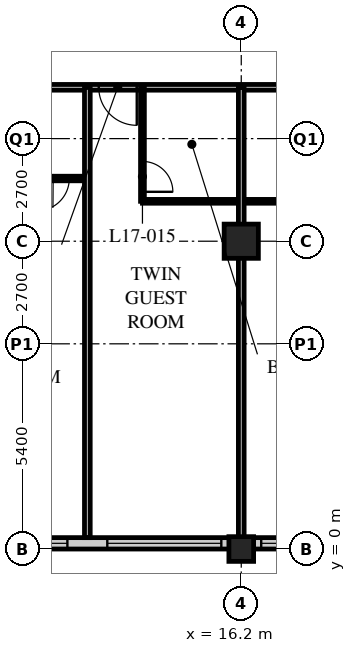
"""IFC4 building model, lengths in metres.
Left out: names, types, materials, properties, quantities, classifications, styles, units other than length and angle.
Written with IfcOpenShell. Run it as: python <this file> out.ifc"""

import sys

from ifc_helpers import new_model, si_unit, direction, frame, frame_2d, origin, origin_2d, place, context, subcontext, project, spatial, rectangle, hollow_rectangle, extrude, element, fill, save


model = new_model("IFC4")
c1 = context("Model", 3, precision=1e-05, world=origin(), true_north=direction((0.0, 1.0)))
c2 = subcontext(c1, "Body", "Model", "MODEL_VIEW")
j1 = project(units=[si_unit("LENGTHUNIT", "METRE"), si_unit("PLANEANGLEUNIT", "RADIAN")], contexts=[c1])
p1 = place(None, origin())
s1 = spatial("IfcSite", under=j1, at=p1, CompositionType="ELEMENT")
p2 = place(p1, origin())
s2 = spatial("IfcBuilding", under=s1, at=p2, CompositionType="ELEMENT")
p3 = place(p2, frame((0.0, 0.0, 70.4)))
s3 = spatial("IfcBuildingStorey", under=s2, at=p3, CompositionType="ELEMENT", Elevation=70.4)
p4 = place(p3, frame((16.2, 0.0, 0.0), z_axis=(0.0, 0.0, 1.0), x_axis=(1.0, 0.0, 0.0)))
e1 = element("IfcColumn", 1, at=p4, inside=s3, PredefinedType="COLUMN", context=c2, shape_type="SweptSolid", body=[
    extrude(hollow_rectangle(XDim=0.65, YDim=0.65, WallThickness=0.05, at=origin_2d()), origin(), (0.0, 0.0, 1.0), 3.4),
])
p5 = place(p3, frame((16.2, 8.1, 0.0), z_axis=(0.0, 0.0, 1.0), x_axis=(1.0, 0.0, 0.0)))
e2 = element("IfcColumn", 2, at=p5, inside=s3, PredefinedType="COLUMN", context=c2, shape_type="SweptSolid", body=[
    extrude(hollow_rectangle(XDim=0.9, YDim=0.9, WallThickness=0.09, at=origin_2d()), origin(), (0.0, 0.0, 1.0), 3.4),
])
p6 = place(p3, frame((8.4, 0.15, 0.0), z_axis=(0.0, 0.0, 1.0), x_axis=(1.0, 0.0, 0.0)))
e3 = element("IfcWall", 3, at=p6, inside=s3, PredefinedType="SOLIDWALL", context=c2, shape_type="SweptSolid", body=[
    extrude(rectangle(XDim=40.2, YDim=0.3, at=frame_2d((20.1, 0.0))), origin(), (0.0, 0.0, 1.0), 3.19),
])
p7 = place(p6, frame((0.225, 0.0, 0.9)))
e4 = element("IfcOpeningElement", 4, at=p7, cuts=e3, PredefinedType="OPENING", context=c2, shape_type="SweptSolid", body=[
    extrude(rectangle(XDim=3.0, YDim=2.0, at=frame_2d((1.5, 1.0))), frame((0.0, 0.16, 0.0), z_axis=(0.0, -1.0, 0.0), x_axis=(1.0, 0.0, 0.0)), (0.0, 0.0, 1.0), 0.32),
])
p8 = place(p6, frame((4.275, 0.0, 0.9)))
e5 = element("IfcOpeningElement", 5, at=p8, cuts=e3, PredefinedType="OPENING", context=c2, shape_type="SweptSolid", body=[
    extrude(rectangle(XDim=3.0, YDim=2.0, at=frame_2d((1.5, 1.0))), frame((0.0, 0.16, 0.0), z_axis=(0.0, -1.0, 0.0), x_axis=(1.0, 0.0, 0.0)), (0.0, 0.0, 1.0), 0.32),
])
p9 = place(p6, frame((8.325, 0.0, 0.9)))
e6 = element("IfcOpeningElement", 6, at=p9, cuts=e3, PredefinedType="OPENING", context=c2, shape_type="SweptSolid", body=[
    extrude(rectangle(XDim=3.0, YDim=2.0, at=frame_2d((1.5, 1.0))), frame((0.0, 0.16, 0.0), z_axis=(0.0, -1.0, 0.0), x_axis=(1.0, 0.0, 0.0)), (0.0, 0.0, 1.0), 0.32),
])
p10 = place(p6, frame((12.375, 0.0, 0.9)))
e7 = element("IfcOpeningElement", 7, at=p10, cuts=e3, PredefinedType="OPENING", context=c2, shape_type="SweptSolid", body=[
    extrude(rectangle(XDim=3.0, YDim=2.0, at=frame_2d((1.5, 1.0))), frame((0.0, 0.16, 0.0), z_axis=(0.0, -1.0, 0.0), x_axis=(1.0, 0.0, 0.0)), (0.0, 0.0, 1.0), 0.32),
])
p11 = place(p6, frame((16.425, 0.0, 0.9)))
e8 = element("IfcOpeningElement", 8, at=p11, cuts=e3, PredefinedType="OPENING", context=c2, shape_type="SweptSolid", body=[
    extrude(rectangle(XDim=3.0, YDim=2.0, at=frame_2d((1.5, 1.0))), frame((0.0, 0.16, 0.0), z_axis=(0.0, -1.0, 0.0), x_axis=(1.0, 0.0, 0.0)), (0.0, 0.0, 1.0), 0.32),
])
p12 = place(p6, frame((20.475, 0.0, 0.9)))
e9 = element("IfcOpeningElement", 9, at=p12, cuts=e3, PredefinedType="OPENING", context=c2, shape_type="SweptSolid", body=[
    extrude(rectangle(XDim=3.0, YDim=2.0, at=frame_2d((1.5, 1.0))), frame((0.0, 0.16, 0.0), z_axis=(0.0, -1.0, 0.0), x_axis=(1.0, 0.0, 0.0)), (0.0, 0.0, 1.0), 0.32),
])
p13 = place(p6, frame((24.525, 0.0, 0.9)))
e10 = element("IfcOpeningElement", 10, at=p13, cuts=e3, PredefinedType="OPENING", context=c2, shape_type="SweptSolid", body=[
    extrude(rectangle(XDim=3.0, YDim=2.0, at=frame_2d((1.5, 1.0))), frame((0.0, 0.16, 0.0), z_axis=(0.0, -1.0, 0.0), x_axis=(1.0, 0.0, 0.0)), (0.0, 0.0, 1.0), 0.32),
])
p14 = place(p6, frame((28.575, 0.0, 0.9)))
e11 = element("IfcOpeningElement", 11, at=p14, cuts=e3, PredefinedType="OPENING", context=c2, shape_type="SweptSolid", body=[
    extrude(rectangle(XDim=3.0, YDim=2.0, at=frame_2d((1.5, 1.0))), frame((0.0, 0.16, 0.0), z_axis=(0.0, -1.0, 0.0), x_axis=(1.0, 0.0, 0.0)), (0.0, 0.0, 1.0), 0.32),
])
p15 = place(p6, frame((32.625, 0.0, 0.9)))
e12 = element("IfcOpeningElement", 12, at=p15, cuts=e3, PredefinedType="OPENING", context=c2, shape_type="SweptSolid", body=[
    extrude(rectangle(XDim=3.0, YDim=2.0, at=frame_2d((1.5, 1.0))), frame((0.0, 0.16, 0.0), z_axis=(0.0, -1.0, 0.0), x_axis=(1.0, 0.0, 0.0)), (0.0, 0.0, 1.0), 0.32),
])
p16 = place(p6, frame((36.675, 0.0, 0.9)))
e13 = element("IfcOpeningElement", 13, at=p16, cuts=e3, PredefinedType="OPENING", context=c2, shape_type="SweptSolid", body=[
    extrude(rectangle(XDim=3.0, YDim=2.0, at=frame_2d((1.5, 1.0))), frame((0.0, 0.16, 0.0), z_axis=(0.0, -1.0, 0.0), x_axis=(1.0, 0.0, 0.0)), (0.0, 0.0, 1.0), 0.32),
])
p17 = place(p3, frame((8.1, 12.15, 0.0), z_axis=(0.0, 0.0, 1.0), x_axis=(1.0, 0.0, 0.0)))
e14 = element("IfcWall", 14, at=p17, inside=s3, PredefinedType="PARTITIONING", context=c2, shape_type="SweptSolid", body=[
    extrude(rectangle(XDim=36.45, YDim=0.15, at=frame_2d((18.225, 0.0))), origin(), (0.0, 0.0, 1.0), 3.19),
])
p18 = place(p17, frame((4.35, 0.0, 0.0)))
e15 = element("IfcOpeningElement", 15, at=p18, cuts=e14, PredefinedType="OPENING", context=c2, shape_type="SweptSolid", body=[
    extrude(rectangle(XDim=1.0, YDim=2.1, at=frame_2d((0.5, 1.05))), frame((0.0, 0.085, 0.0), z_axis=(0.0, -1.0, 0.0), x_axis=(1.0, 0.0, 0.0)), (0.0, 0.0, 1.0), 0.17),
])
p19 = place(p17, frame((10.55, 0.0, 0.0)))
e16 = element("IfcOpeningElement", 16, at=p19, cuts=e14, PredefinedType="OPENING", context=c2, shape_type="SweptSolid", body=[
    extrude(rectangle(XDim=1.0, YDim=2.1, at=frame_2d((0.5, 1.05))), frame((0.0, 0.085, 0.0), z_axis=(0.0, -1.0, 0.0), x_axis=(1.0, 0.0, 0.0)), (0.0, 0.0, 1.0), 0.17),
])
p20 = place(p17, frame((14.6, 0.0, 0.0)))
e17 = element("IfcOpeningElement", 17, at=p20, cuts=e14, PredefinedType="OPENING", context=c2, shape_type="SweptSolid", body=[
    extrude(rectangle(XDim=1.0, YDim=2.1, at=frame_2d((0.5, 1.05))), frame((0.0, 0.085, 0.0), z_axis=(0.0, -1.0, 0.0), x_axis=(1.0, 0.0, 0.0)), (0.0, 0.0, 1.0), 0.17),
])
p21 = place(p17, frame((18.65, 0.0, 0.0)))
e18 = element("IfcOpeningElement", 18, at=p21, cuts=e14, PredefinedType="OPENING", context=c2, shape_type="SweptSolid", body=[
    extrude(rectangle(XDim=1.0, YDim=2.1, at=frame_2d((0.5, 1.05))), frame((0.0, 0.085, 0.0), z_axis=(0.0, -1.0, 0.0), x_axis=(1.0, 0.0, 0.0)), (0.0, 0.0, 1.0), 0.17),
])
p22 = place(p17, frame((22.7, 0.0, 0.0)))
e19 = element("IfcOpeningElement", 19, at=p22, cuts=e14, PredefinedType="OPENING", context=c2, shape_type="SweptSolid", body=[
    extrude(rectangle(XDim=1.0, YDim=2.1, at=frame_2d((0.5, 1.05))), frame((0.0, 0.085, 0.0), z_axis=(0.0, -1.0, 0.0), x_axis=(1.0, 0.0, 0.0)), (0.0, 0.0, 1.0), 0.17),
])
p23 = place(p17, frame((24.6, 0.0, 0.0)))
e20 = element("IfcOpeningElement", 20, at=p23, cuts=e14, PredefinedType="OPENING", context=c2, shape_type="SweptSolid", body=[
    extrude(rectangle(XDim=1.0, YDim=2.1, at=frame_2d((0.5, 1.05))), frame((0.0, 0.085, 0.0), z_axis=(0.0, -1.0, 0.0), x_axis=(1.0, 0.0, 0.0)), (0.0, 0.0, 1.0), 0.17),
])
p24 = place(p17, frame((30.8, 0.0, 0.0)))
e21 = element("IfcOpeningElement", 21, at=p24, cuts=e14, PredefinedType="OPENING", context=c2, shape_type="SweptSolid", body=[
    extrude(rectangle(XDim=1.0, YDim=2.1, at=frame_2d((0.5, 1.05))), frame((0.0, 0.085, 0.0), z_axis=(0.0, -1.0, 0.0), x_axis=(1.0, 0.0, 0.0)), (0.0, 0.0, 1.0), 0.17),
])
p25 = place(p17, frame((1.525, 0.0, 0.0)))
e22 = element("IfcOpeningElement", 22, at=p25, cuts=e14, PredefinedType="OPENING", context=c2, shape_type="SweptSolid", body=[
    extrude(rectangle(XDim=1.0, YDim=2.1, at=frame_2d((0.5, 1.05))), frame((0.0, 0.085, 0.0), z_axis=(0.0, -1.0, 0.0), x_axis=(1.0, 0.0, 0.0)), (0.0, 0.0, 1.0), 0.17),
])
p26 = place(p17, frame((33.925, 0.0, 0.0)))
e23 = element("IfcOpeningElement", 23, at=p26, cuts=e14, PredefinedType="OPENING", context=c2, shape_type="SweptSolid", body=[
    extrude(rectangle(XDim=1.0, YDim=2.1, at=frame_2d((0.5, 1.05))), frame((0.0, 0.085, 0.0), z_axis=(0.0, -1.0, 0.0), x_axis=(1.0, 0.0, 0.0)), (0.0, 0.0, 1.0), 0.17),
])
p27 = place(p3, frame((13.6, 9.15, 0.0), z_axis=(0.0, 0.0, 1.0), x_axis=(1.0, 0.0, 0.0)))
e24 = element("IfcWall", 24, at=p27, inside=s3, PredefinedType="PARTITIONING", context=c2, shape_type="SweptSolid", body=[
    extrude(rectangle(XDim=4.9, YDim=0.1, at=frame_2d((2.45, 0.0))), origin(), (0.0, 0.0, 1.0), 3.19),
])
p28 = place(p3, frame((13.6, 12.15, 0.0), z_axis=(0.0, 0.0, 1.0), x_axis=(0.0, -1.0, 0.0)))
e25 = element("IfcWall", 25, at=p28, inside=s3, PredefinedType="PARTITIONING", context=c2, shape_type="SweptSolid", body=[
    extrude(rectangle(XDim=3.0, YDim=0.1, at=frame_2d((1.5, 0.0))), origin(), (0.0, 0.0, 1.0), 3.19),
])
p29 = place(p28, frame((1.95, 0.0, 0.0)))
e26 = element("IfcOpeningElement", 26, at=p29, cuts=e25, PredefinedType="OPENING", context=c2, shape_type="SweptSolid", body=[
    extrude(rectangle(XDim=0.8, YDim=2.1, at=frame_2d((0.4, 1.05))), frame((0.0, 0.06, 0.0), z_axis=(0.0, -1.0, 0.0), x_axis=(1.0, 0.0, 0.0)), (0.0, 0.0, 1.0), 0.12),
])
p30 = place(p3, frame((16.2, 12.15, 0.0), z_axis=(0.0, 0.0, 1.0), x_axis=(0.0, -1.0, 0.0)))
e27 = element("IfcWall", 27, at=p30, inside=s3, PredefinedType="PARTITIONING", context=c2, shape_type="SweptSolid", body=[
    extrude(rectangle(XDim=11.85, YDim=0.15, at=frame_2d((5.925, 0.0))), origin(), (0.0, 0.0, 1.0), 2.578),
])
p31 = place(p3, frame((4.1, 9.75, 0.0), z_axis=(0.0, 0.0, 1.0), x_axis=(1.0, 0.0, 0.0)))
e28 = element("IfcWall", 28, at=p31, inside=s3, PredefinedType="PARTITIONING", context=c2, shape_type="SweptSolid", body=[
    extrude(rectangle(XDim=8.05, YDim=0.12, at=frame_2d((4.025, 0.0))), origin(), (0.0, 0.0, 1.0), 3.19),
])
p32 = place(p31, frame((6.725, 0.0, 0.0)))
e29 = element("IfcOpeningElement", 29, at=p32, cuts=e28, PredefinedType="OPENING", context=c2, shape_type="SweptSolid", body=[
    extrude(rectangle(XDim=0.85, YDim=2.1, at=frame_2d((0.425, 1.05))), frame((0.0, 0.07, 0.0), z_axis=(0.0, -1.0, 0.0), x_axis=(1.0, 0.0, 0.0)), (0.0, 0.0, 1.0), 0.14),
])
p33 = place(p31, frame((2.875, 0.0, 0.0)))
e30 = element("IfcOpeningElement", 30, at=p33, cuts=e28, PredefinedType="OPENING", context=c2, shape_type="SweptSolid", body=[
    extrude(rectangle(XDim=0.85, YDim=2.1, at=frame_2d((0.425, 1.05))), frame((0.0, 0.07, 0.0), z_axis=(0.0, -1.0, 0.0), x_axis=(1.0, 0.0, 0.0)), (0.0, 0.0, 1.0), 0.14),
])
p34 = place(p3, frame((12.15, 12.15, 0.0), z_axis=(0.0, 0.0, 1.0), x_axis=(0.0, -1.0, 0.0)))
e31 = element("IfcWall", 31, at=p34, inside=s3, PredefinedType="PARTITIONING", context=c2, shape_type="SweptSolid", body=[
    extrude(rectangle(XDim=11.85, YDim=0.15, at=frame_2d((5.925, 0.0))), origin(), (0.0, 0.0, 1.0), 3.19),
])
p35 = place(p7, origin())
e32 = element("IfcWindow", 32, at=p35, inside=s3, PartitioningType="SINGLE_PANEL", PredefinedType="WINDOW", context=c2, shape_type="SweptSolid", body=[
    extrude(rectangle(XDim=3.0, YDim=2.0, at=frame_2d((1.5, 1.0))), frame((0.0, 0.03, 0.0), z_axis=(0.0, -1.0, 0.0), x_axis=(1.0, 0.0, 0.0)), (0.0, 0.0, 1.0), 0.06),
])
fill(e4, e32)
p36 = place(p8, origin())
e33 = element("IfcWindow", 33, at=p36, inside=s3, PartitioningType="SINGLE_PANEL", PredefinedType="WINDOW", context=c2, shape_type="SweptSolid", body=[
    extrude(rectangle(XDim=3.0, YDim=2.0, at=frame_2d((1.5, 1.0))), frame((0.0, 0.03, 0.0), z_axis=(0.0, -1.0, 0.0), x_axis=(1.0, 0.0, 0.0)), (0.0, 0.0, 1.0), 0.06),
])
fill(e5, e33)
p37 = place(p9, origin())
e34 = element("IfcWindow", 34, at=p37, inside=s3, PartitioningType="SINGLE_PANEL", PredefinedType="WINDOW", context=c2, shape_type="SweptSolid", body=[
    extrude(rectangle(XDim=3.0, YDim=2.0, at=frame_2d((1.5, 1.0))), frame((0.0, 0.03, 0.0), z_axis=(0.0, -1.0, 0.0), x_axis=(1.0, 0.0, 0.0)), (0.0, 0.0, 1.0), 0.06),
])
fill(e6, e34)
p38 = place(p29, origin())
e35 = element("IfcDoor", 35, at=p38, inside=s3, OperationType="SINGLE_SWING_RIGHT", PredefinedType="DOOR", context=c2, shape_type="SweptSolid", body=[
    extrude(rectangle(XDim=0.8, YDim=2.1, at=frame_2d((0.4, 1.05))), frame((0.0, 0.025, 0.0), z_axis=(0.0, -1.0, 0.0), x_axis=(1.0, 0.0, 0.0)), (0.0, 0.0, 1.0), 0.05),
])
fill(e26, e35)
p39 = place(p18, origin())
e36 = element("IfcDoor", 36, at=p39, inside=s3, OperationType="SINGLE_SWING_LEFT", PredefinedType="DOOR", context=c2, shape_type="SweptSolid", body=[
    extrude(rectangle(XDim=1.0, YDim=2.1, at=frame_2d((0.5, 1.05))), frame((0.0, 0.025, 0.0), z_axis=(0.0, -1.0, 0.0), x_axis=(1.0, 0.0, 0.0)), (0.0, 0.0, 1.0), 0.05),
])
fill(e15, e36)
p40 = place(p32, origin())
e37 = element("IfcDoor", 37, at=p40, inside=s3, OperationType="SINGLE_SWING_RIGHT", PredefinedType="DOOR", context=c2, shape_type="SweptSolid", body=[
    extrude(rectangle(XDim=0.85, YDim=2.1, at=frame_2d((0.425, 1.05))), frame((0.0, 0.025, 0.0), z_axis=(0.0, -1.0, 0.0), x_axis=(1.0, 0.0, 0.0)), (0.0, 0.0, 1.0), 0.05),
])
fill(e29, e37)
save(model, sys.argv[1])
